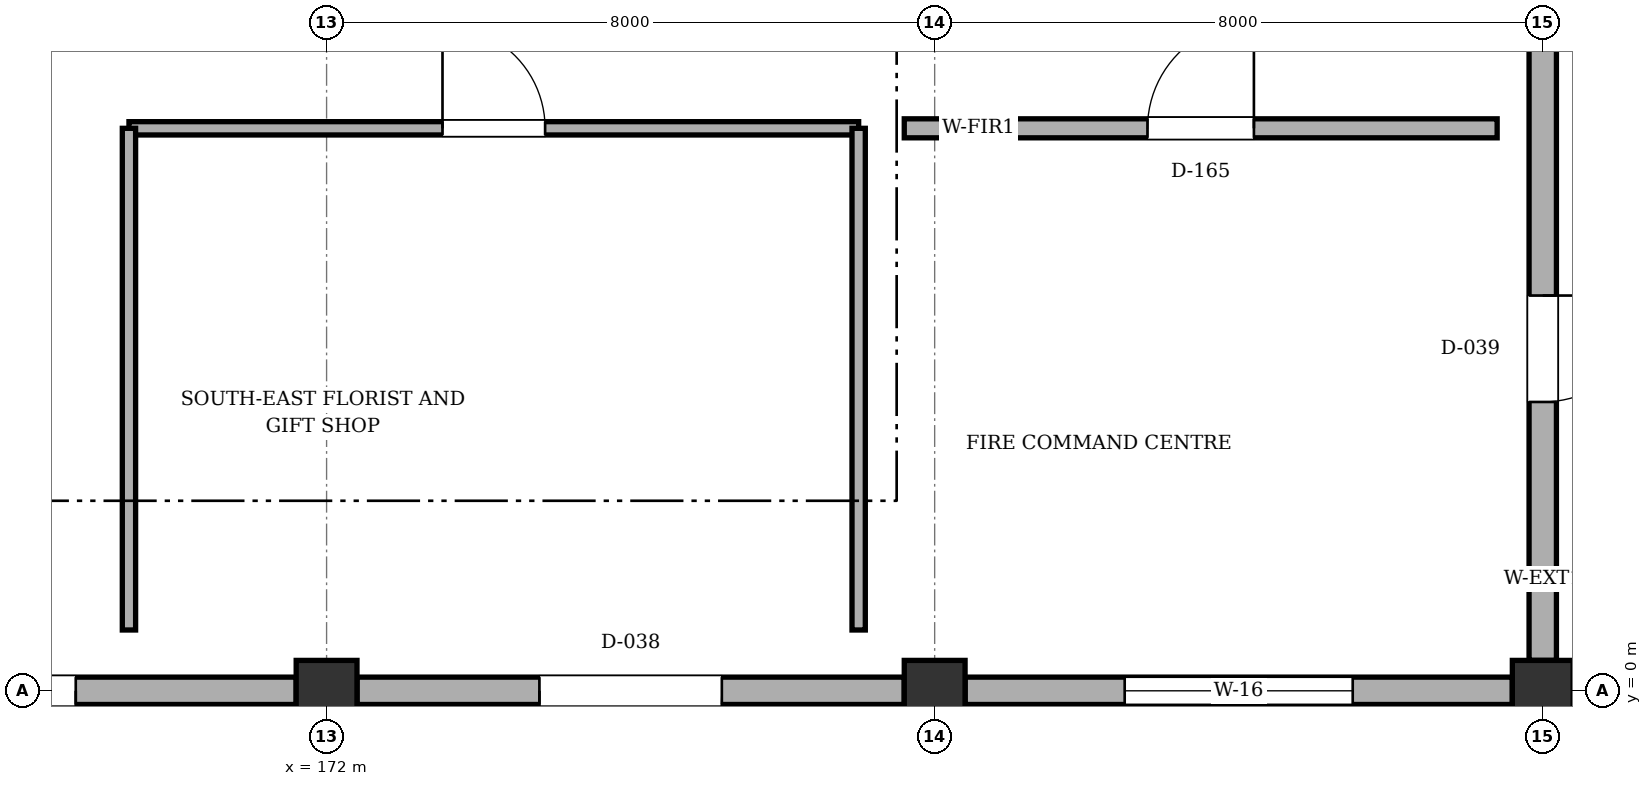
"""IFC4 building model, lengths in metres.
Left out: names, types, materials, properties, quantities, classifications, styles, units other than length and angle.
Written with IfcOpenShell. Run it as: python <this file> out.ifc"""

import sys

from ifc_helpers import new_model, si_unit, direction, frame, frame_2d, origin, origin_2d, place, context, subcontext, project, spatial, rectangle, extrude, element, fill, save


model = new_model("IFC4")
c1 = context("Model", 3, precision=1e-05, world=origin(), true_north=direction((0.0, 1.0)))
c2 = subcontext(c1, "Body", "Model", "MODEL_VIEW")
j1 = project(units=[si_unit("LENGTHUNIT", "METRE"), si_unit("PLANEANGLEUNIT", "RADIAN")], contexts=[c1])
p1 = place(None, origin())
s1 = spatial("IfcSite", under=j1, at=p1, CompositionType="ELEMENT")
p2 = place(p1, origin())
s2 = spatial("IfcBuilding", under=s1, at=p2, CompositionType="ELEMENT")
p3 = place(p2, origin())
s3 = spatial("IfcBuildingStorey", under=s2, at=p3, CompositionType="ELEMENT", Elevation=0.0)
for number, where, z_axis, x_axis in (
    (1, (172.0, 0.0, 0.0), (0.0, 0.0, 1.0), (1.0, 0.0, 0.0)),
    (2, (180.0, 0.0, 0.0), (0.0, 0.0, 1.0), (1.0, 0.0, 0.0)),
    (3, (188.0, 0.0, 0.0), (0.0, 0.0, 1.0), (1.0, 0.0, 0.0)),
):
    element("IfcColumn", number, at=place(p3, frame(where, z_axis=z_axis, x_axis=x_axis)), inside=s3, PredefinedType="COLUMN", context=c2, shape_type="SweptSolid", body=[
        extrude(rectangle(XDim=0.8, YDim=0.8, at=origin_2d()), origin(), (0.0, 0.0, 1.0), 6.6),
    ])
p4 = place(p3, frame((171.6, 0.0, 0.0), z_axis=(0.0, 0.0, 1.0), x_axis=(-1.0, 0.0, 0.0)))
e4 = element("IfcWall", 4, at=p4, inside=s3, PredefinedType="SOLIDWALL", context=c2, shape_type="SweptSolid", body=[
    extrude(rectangle(XDim=8.2, YDim=0.36, at=frame_2d((4.1, 0.0))), origin(), (0.0, 0.0, 1.0), 5.875),
])
p5 = place(p4, frame((2.9, 0.0, 0.0)))
e5 = element("IfcOpeningElement", 5, at=p5, cuts=e4, PredefinedType="OPENING", context=c2, shape_type="SweptSolid", body=[
    extrude(rectangle(XDim=2.4, YDim=2.5, at=frame_2d((1.2, 1.25))), frame((0.0, 0.19, 0.0), z_axis=(0.0, -1.0, 0.0), x_axis=(1.0, 0.0, 0.0)), (0.0, 0.0, 1.0), 0.38),
])
p6 = place(p3, frame((179.6, 0.0, 0.0), z_axis=(0.0, 0.0, 1.0), x_axis=(-1.0, 0.0, 0.0)))
e6 = element("IfcWall", 6, at=p6, inside=s3, PredefinedType="SOLIDWALL", context=c2, shape_type="SweptSolid", body=[
    extrude(rectangle(XDim=7.2, YDim=0.36, at=frame_2d((3.6, 0.0))), origin(), (0.0, 0.0, 1.0), 5.875),
])
p7 = place(p6, frame((2.4, 0.0, 0.0)))
e7 = element("IfcOpeningElement", 7, at=p7, cuts=e6, PredefinedType="OPENING", context=c2, shape_type="SweptSolid", body=[
    extrude(rectangle(XDim=2.4, YDim=2.5, at=frame_2d((1.2, 1.25))), frame((0.0, 0.19, 0.0), z_axis=(0.0, -1.0, 0.0), x_axis=(1.0, 0.0, 0.0)), (0.0, 0.0, 1.0), 0.38),
])
p8 = place(p3, frame((187.6, 0.0, 0.0), z_axis=(0.0, 0.0, 1.0), x_axis=(-1.0, 0.0, 0.0)))
e8 = element("IfcWall", 8, at=p8, inside=s3, PredefinedType="SOLIDWALL", context=c2, shape_type="SweptSolid", body=[
    extrude(rectangle(XDim=7.2, YDim=0.36, at=frame_2d((3.6, 0.0))), origin(), (0.0, 0.0, 1.0), 5.875),
])
p9 = place(p8, frame((2.1, 0.0, 0.95)))
e9 = element("IfcOpeningElement", 9, at=p9, cuts=e8, PredefinedType="OPENING", context=c2, shape_type="SweptSolid", body=[
    extrude(rectangle(XDim=3.0, YDim=2.1, at=frame_2d((1.5, 1.05))), frame((0.0, 0.19, 0.0), z_axis=(0.0, -1.0, 0.0), x_axis=(1.0, 0.0, 0.0)), (0.0, 0.0, 1.0), 0.38),
])
p10 = place(p3, frame((188.0, 8.6, 0.0), z_axis=(0.0, 0.0, 1.0), x_axis=(0.0, -1.0, 0.0)))
e10 = element("IfcWall", 10, at=p10, inside=s3, PredefinedType="SOLIDWALL", context=c2, shape_type="SweptSolid", body=[
    extrude(rectangle(XDim=8.2, YDim=0.36, at=frame_2d((4.1, 0.0))), origin(), (0.0, 0.0, 1.0), 5.875),
])
p11 = place(p10, frame((3.4, 0.0, 0.0)))
e11 = element("IfcOpeningElement", 11, at=p11, cuts=e10, PredefinedType="OPENING", context=c2, shape_type="SweptSolid", body=[
    extrude(rectangle(XDim=1.4, YDim=2.1, at=frame_2d((0.7, 1.05))), frame((0.0, 0.19, 0.0), z_axis=(0.0, -1.0, 0.0), x_axis=(1.0, 0.0, 0.0)), (0.0, 0.0, 1.0), 0.38),
])
p12 = place(p3, frame((169.4, 7.4, 0.0), z_axis=(0.0, 0.0, 1.0), x_axis=(1.0, 0.0, 0.0)))
e12 = element("IfcWall", 12, at=p12, inside=s3, PredefinedType="PARTITIONING", context=c2, shape_type="SweptSolid", body=[
    extrude(rectangle(XDim=9.6, YDim=0.175, at=frame_2d((4.8, 0.0))), origin(), (0.0, 0.0, 1.0), 4.4),
])
p13 = place(p12, frame((4.125, 0.0, 0.0)))
e13 = element("IfcOpeningElement", 13, at=p13, cuts=e12, PredefinedType="OPENING", context=c2, shape_type="SweptSolid", body=[
    extrude(rectangle(XDim=1.35, YDim=2.1, at=frame_2d((0.675, 1.05))), frame((0.0, 0.097, 0.0), z_axis=(0.0, -1.0, 0.0), x_axis=(1.0, 0.0, 0.0)), (0.0, 0.0, 1.0), 0.195),
])
for number, where, z_axis, x_axis in (
    (14, (169.4, 0.8, 0.0), (0.0, 0.0, 1.0), (0.0, 1.0, 0.0)),
    (15, (179.0, 7.4, 0.0), (0.0, 0.0, 1.0), (0.0, -1.0, 0.0)),
):
    element("IfcWall", number, at=place(p3, frame(where, z_axis=z_axis, x_axis=x_axis)), inside=s3, PredefinedType="PARTITIONING", context=c2, shape_type="SweptSolid", body=[
        extrude(rectangle(XDim=6.6, YDim=0.175, at=frame_2d((3.3, 0.0))), origin(), (0.0, 0.0, 1.0), 4.4),
    ])
p14 = place(p3, frame((179.6, 7.4, 0.0), z_axis=(0.0, 0.0, 1.0), x_axis=(1.0, 0.0, 0.0)))
e16 = element("IfcWall", 16, at=p14, inside=s3, PredefinedType="SOLIDWALL", context=c2, shape_type="SweptSolid", body=[
    extrude(rectangle(XDim=7.8, YDim=0.25, at=frame_2d((3.9, 0.0))), origin(), (0.0, 0.0, 1.0), 4.4),
])
p15 = place(p14, frame((3.2, 0.0, 0.0)))
e17 = element("IfcOpeningElement", 17, at=p15, cuts=e16, PredefinedType="OPENING", context=c2, shape_type="SweptSolid", body=[
    extrude(rectangle(XDim=1.4, YDim=2.1, at=frame_2d((0.7, 1.05))), frame((0.0, 0.135, 0.0), z_axis=(0.0, -1.0, 0.0), x_axis=(1.0, 0.0, 0.0)), (0.0, 0.0, 1.0), 0.27),
])
p16 = place(p5, origin())
e18 = element("IfcDoor", 18, at=p16, inside=s3, OperationType="SINGLE_SWING_LEFT", PredefinedType="DOOR", context=c2, shape_type="SweptSolid", body=[
    extrude(rectangle(XDim=2.4, YDim=2.5, at=frame_2d((1.2, 1.25))), frame((0.0, 0.025, 0.0), z_axis=(0.0, -1.0, 0.0), x_axis=(1.0, 0.0, 0.0)), (0.0, 0.0, 1.0), 0.05),
])
fill(e5, e18)
p17 = place(p7, origin())
e19 = element("IfcDoor", 19, at=p17, inside=s3, OperationType="SINGLE_SWING_RIGHT", PredefinedType="DOOR", context=c2, shape_type="SweptSolid", body=[
    extrude(rectangle(XDim=2.4, YDim=2.5, at=frame_2d((1.2, 1.25))), frame((0.0, 0.025, 0.0), z_axis=(0.0, -1.0, 0.0), x_axis=(1.0, 0.0, 0.0)), (0.0, 0.0, 1.0), 0.05),
])
fill(e7, e19)
p18 = place(p9, origin())
e20 = element("IfcWindow", 20, at=p18, inside=s3, PartitioningType="SINGLE_PANEL", PredefinedType="WINDOW", context=c2, shape_type="SweptSolid", body=[
    extrude(rectangle(XDim=3.0, YDim=2.1, at=frame_2d((1.5, 1.05))), frame((0.0, 0.03, 0.0), z_axis=(0.0, -1.0, 0.0), x_axis=(1.0, 0.0, 0.0)), (0.0, 0.0, 1.0), 0.06),
])
fill(e9, e20)
p19 = place(p11, origin())
e21 = element("IfcDoor", 21, at=p19, inside=s3, OperationType="SINGLE_SWING_LEFT", PredefinedType="DOOR", context=c2, shape_type="SweptSolid", body=[
    extrude(rectangle(XDim=1.4, YDim=2.1, at=frame_2d((0.7, 1.05))), frame((0.0, 0.025, 0.0), z_axis=(0.0, -1.0, 0.0), x_axis=(1.0, 0.0, 0.0)), (0.0, 0.0, 1.0), 0.05),
])
fill(e11, e21)
p20 = place(p13, origin())
e22 = element("IfcDoor", 22, at=p20, inside=s3, OperationType="SINGLE_SWING_LEFT", PredefinedType="DOOR", context=c2, shape_type="SweptSolid", body=[
    extrude(rectangle(XDim=1.35, YDim=2.1, at=frame_2d((0.675, 1.05))), frame((0.0, 0.025, 0.0), z_axis=(0.0, -1.0, 0.0), x_axis=(1.0, 0.0, 0.0)), (0.0, 0.0, 1.0), 0.05),
])
fill(e13, e22)
p21 = place(p15, origin())
e23 = element("IfcDoor", 23, at=p21, inside=s3, OperationType="SINGLE_SWING_RIGHT", PredefinedType="DOOR", context=c2, shape_type="SweptSolid", body=[
    extrude(rectangle(XDim=1.4, YDim=2.1, at=frame_2d((0.7, 1.05))), frame((0.0, 0.025, 0.0), z_axis=(0.0, -1.0, 0.0), x_axis=(1.0, 0.0, 0.0)), (0.0, 0.0, 1.0), 0.05),
])
fill(e17, e23)
save(model, sys.argv[1])
